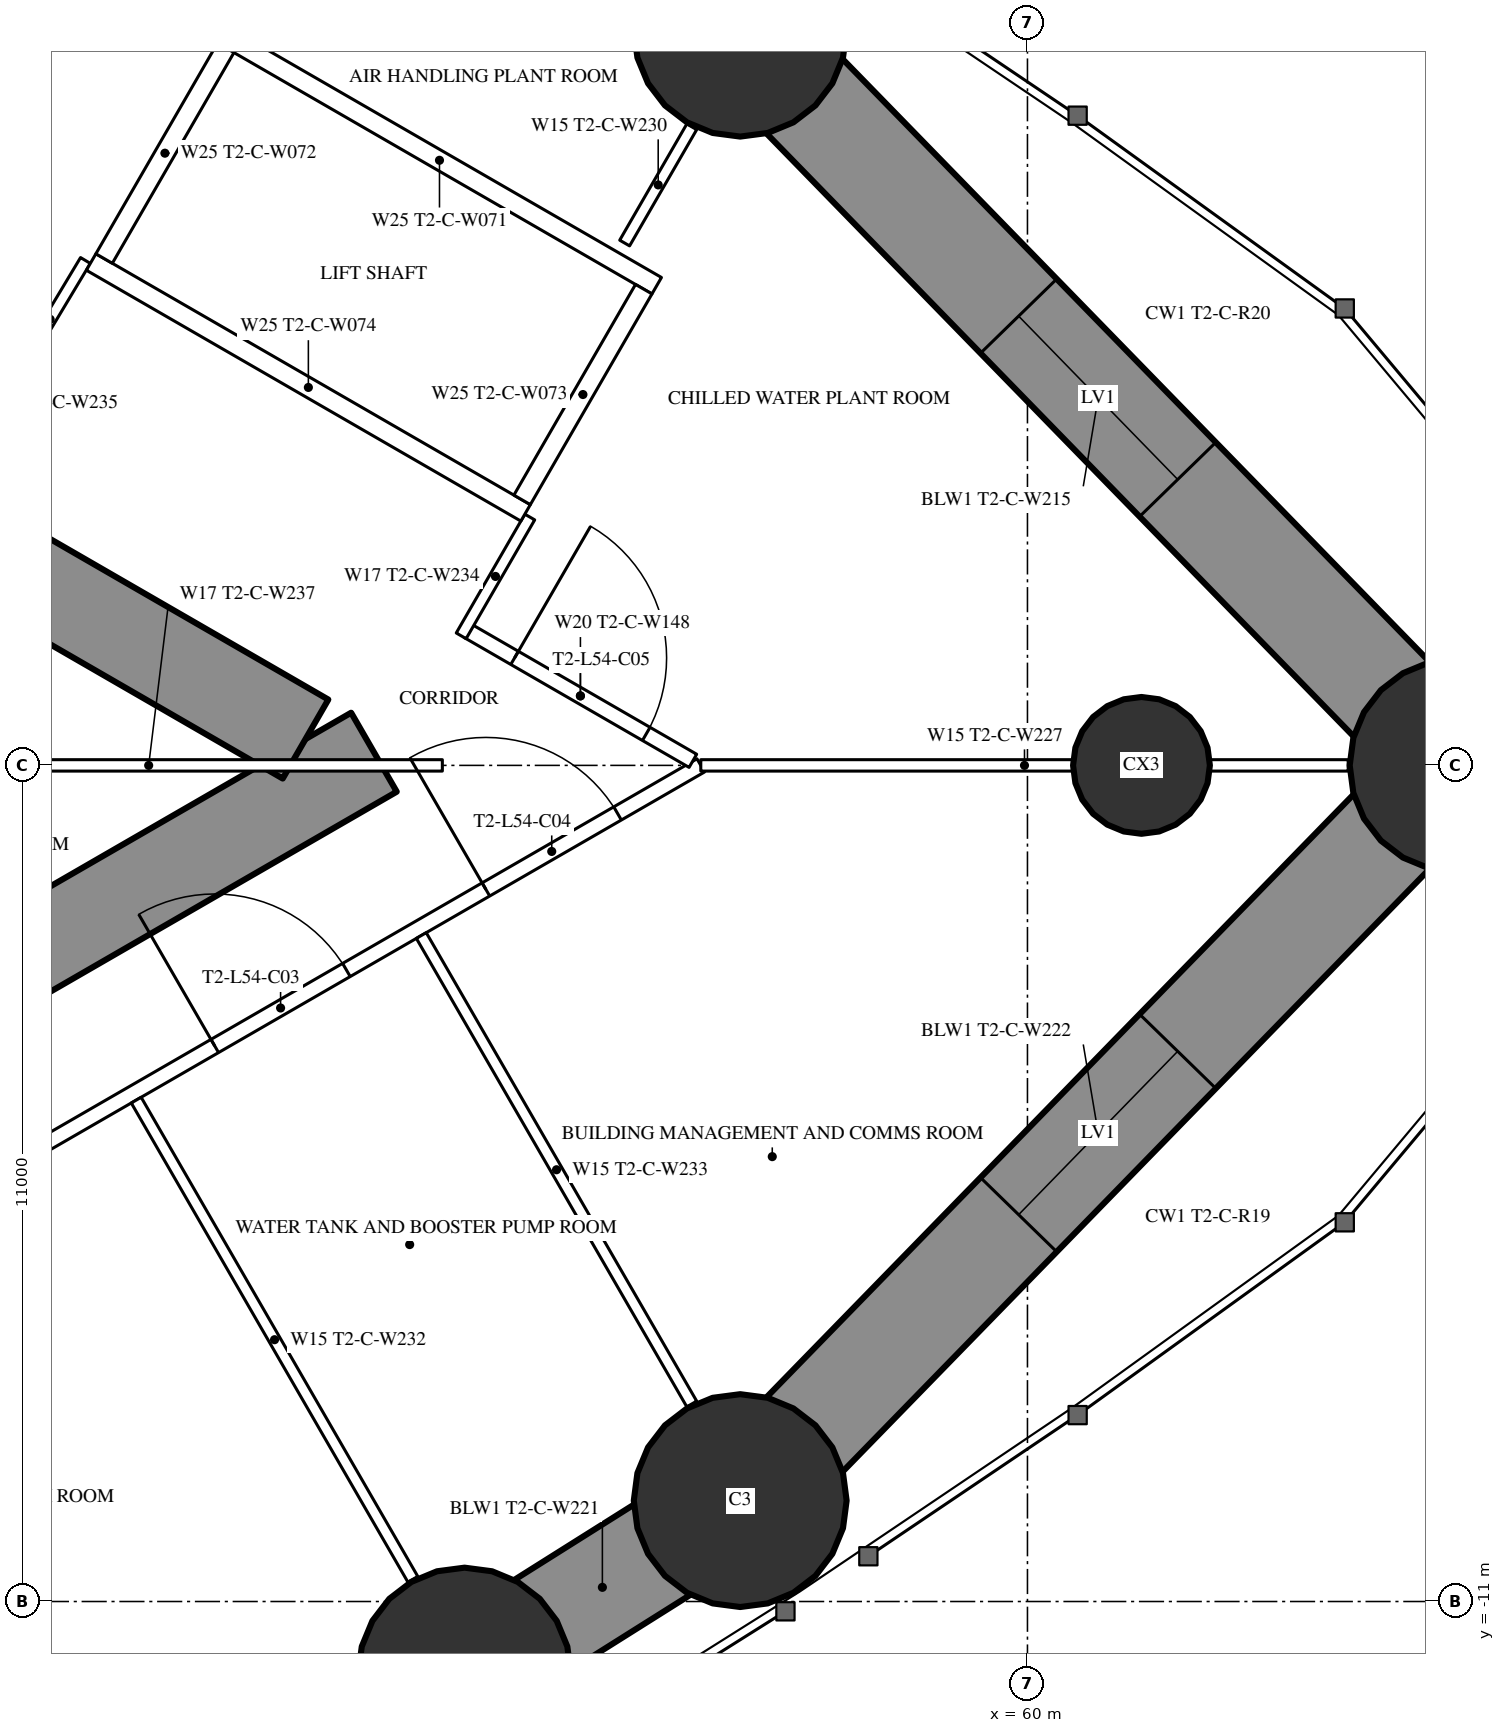
"""IFC4 building model, lengths in metres.
Left out: names, types, materials, properties, quantities, classifications, styles, units other than length and angle.
Written with IfcOpenShell. Run it as: python <this file> out.ifc"""

import sys

from ifc_helpers import new_model, si_unit, direction, frame, frame_2d, origin, origin_2d, place, context, subcontext, project, spatial, rectangle, circle, extrude, element, fill, save


model = new_model("IFC4")
c1 = context("Model", 3, precision=1e-05, world=origin(), true_north=direction((0.0, 1.0)))
c2 = subcontext(c1, "Body", "Model", "MODEL_VIEW")
j1 = project(units=[si_unit("LENGTHUNIT", "METRE"), si_unit("PLANEANGLEUNIT", "RADIAN")], contexts=[c1])
p1 = place(None, origin())
s1 = spatial("IfcSite", under=j1, at=p1, CompositionType="ELEMENT")
p2 = place(p1, origin())
s2 = spatial("IfcBuilding", under=s1, at=p2, CompositionType="ELEMENT")
p3 = place(p2, frame((0.0, 0.0, 201.8)))
s3 = spatial("IfcBuildingStorey", under=s2, at=p3, CompositionType="ELEMENT", Elevation=201.8)
for number, where, z_axis, x_axis in (
    (1, (65.64, 0.0, 0.0), (0.0, 0.0, 1.0), (1.0, 0.0, 0.0)),
    (2, (56.221, 9.672, 0.0), (0.0, 0.0, 1.0), (1.0, 0.0, 0.0)),
    (3, (52.594, -11.955, 0.0), (0.0, 0.0, 1.0), (1.0, 0.0, 0.0)),
    (4, (56.221, -9.672, 0.0), (0.0, 0.0, 1.0), (1.0, 0.0, 0.0)),
):
    element("IfcColumn", number, at=place(p3, frame(where, z_axis=z_axis, x_axis=x_axis)), inside=s3, PredefinedType="COLUMN", context=c2, shape_type="SweptSolid", body=[
        extrude(circle(Radius=1.4, at=origin_2d()), origin(), (0.0, 0.0, 1.0), 3.5),
    ])
p4 = place(p3, frame((61.5, 0.0, 0.0), z_axis=(0.0, 0.0, 1.0), x_axis=(1.0, 0.0, 0.0)))
e5 = element("IfcColumn", 5, at=p4, inside=s3, PredefinedType="COLUMN", context=c2, shape_type="SweptSolid", body=[
    extrude(circle(Radius=0.9, at=origin_2d()), origin(), (0.0, 0.0, 1.0), 3.5),
])
p5 = place(p3, frame((27.2, -13.8, 0.0), z_axis=(0.0, 0.0, 1.0), x_axis=(0.866027159892, 0.499996958321, 0.0)))
e6 = element("IfcWall", 6, at=p5, inside=s3, PredefinedType="SHEAR", context=c2, shape_type="SweptSolid", body=[
    extrude(rectangle(XDim=27.947, YDim=1.2, at=frame_2d((13.973, 0.0))), origin(), (0.0, 0.0, 1.0), 3.5),
])
p6 = place(p5, frame((6.5, 0.0, 0.0)))
e7 = element("IfcOpeningElement", 7, at=p6, cuts=e6, PredefinedType="OPENING", context=c2, shape_type="SweptSolid", body=[
    extrude(rectangle(XDim=1.0, YDim=2.2, at=frame_2d((0.5, 1.1))), frame((0.0, 0.61, 0.0), z_axis=(0.0, -1.0, 0.0), x_axis=(1.0, 0.0, 0.0)), (0.0, 0.0, 1.0), 1.22),
])
p7 = place(p5, frame((14.045, 0.0, 0.0)))
e8 = element("IfcOpeningElement", 8, at=p7, cuts=e6, PredefinedType="OPENING", context=c2, shape_type="SweptSolid", body=[
    extrude(rectangle(XDim=1.8, YDim=2.2, at=frame_2d((0.9, 1.1))), frame((0.0, 0.61, 0.0), z_axis=(0.0, -1.0, 0.0), x_axis=(1.0, 0.0, 0.0)), (0.0, 0.0, 1.0), 1.22),
])
p8 = place(p3, frame((27.2, 13.8, 0.0), z_axis=(0.0, 0.0, 1.0), x_axis=(0.866024515034, -0.500001539357, 0.0)))
e9 = element("IfcWall", 9, at=p8, inside=s3, PredefinedType="SHEAR", context=c2, shape_type="SweptSolid", body=[
    extrude(rectangle(XDim=26.907, YDim=1.2, at=frame_2d((13.454, 0.0))), origin(), (0.0, 0.0, 1.0), 3.5),
])
p9 = place(p8, frame((6.5, 0.0, 0.0)))
e10 = element("IfcOpeningElement", 10, at=p9, cuts=e9, PredefinedType="OPENING", context=c2, shape_type="SweptSolid", body=[
    extrude(rectangle(XDim=1.0, YDim=2.2, at=frame_2d((0.5, 1.1))), frame((0.0, 0.61, 0.0), z_axis=(0.0, -1.0, 0.0), x_axis=(1.0, 0.0, 0.0)), (0.0, 0.0, 1.0), 1.22),
])
p10 = place(p8, frame((12.545, 0.0, 0.0)))
e11 = element("IfcOpeningElement", 11, at=p10, cuts=e9, PredefinedType="OPENING", context=c2, shape_type="SweptSolid", body=[
    extrude(rectangle(XDim=1.8, YDim=2.2, at=frame_2d((0.9, 1.1))), frame((0.0, 0.61, 0.0), z_axis=(0.0, -1.0, 0.0), x_axis=(1.0, 0.0, 0.0)), (0.0, 0.0, 1.0), 1.22),
])
p11 = place(p3, frame((45.134, -16.168, 0.0), z_axis=(0.0, 0.0, 1.0), x_axis=(0.870721990329, 0.491775574381, 0.0)))
e12 = element("IfcWall", 12, at=p11, inside=s3, PredefinedType="SHEAR", context=c2, shape_type="SweptSolid", body=[
    extrude(rectangle(XDim=8.569, YDim=1.4, at=frame_2d((4.284, 0.0))), origin(), (0.0, 0.0, 1.0), 3.5),
])
p12 = place(p11, frame((2.784, 0.0, 0.6)))
e13 = element("IfcOpeningElement", 13, at=p12, cuts=e12, PredefinedType="OPENING", context=c2, shape_type="SweptSolid", body=[
    extrude(rectangle(XDim=3.0, YDim=1.2, at=frame_2d((1.5, 0.6))), frame((0.0, 0.71, 0.0), z_axis=(0.0, -1.0, 0.0), x_axis=(1.0, 0.0, 0.0)), (0.0, 0.0, 1.0), 1.42),
])
p13 = place(p3, frame((52.594, -11.955, 0.0), z_axis=(0.0, 0.0, 1.0), x_axis=(0.846348902569, 0.532628890617, 0.0)))
e14 = element("IfcWall", 14, at=p13, inside=s3, PredefinedType="SHEAR", context=c2, shape_type="SweptSolid", body=[
    extrude(rectangle(XDim=4.285, YDim=1.4, at=frame_2d((2.143, 0.0))), origin(), (0.0, 0.0, 1.0), 3.5),
])
p14 = place(p3, frame((56.221, -9.672, 0.0), z_axis=(0.0, 0.0, 1.0), x_axis=(0.697649905443, 0.716438838587, 0.0)))
e15 = element("IfcWall", 15, at=p14, inside=s3, PredefinedType="SHEAR", context=c2, shape_type="SweptSolid", body=[
    extrude(rectangle(XDim=13.501, YDim=1.4, at=frame_2d((6.75, 0.0))), origin(), (0.0, 0.0, 1.0), 3.5),
])
p15 = place(p14, frame((5.25, 0.0, 0.6)))
e16 = element("IfcOpeningElement", 16, at=p15, cuts=e15, PredefinedType="OPENING", context=c2, shape_type="SweptSolid", body=[
    extrude(rectangle(XDim=3.0, YDim=1.2, at=frame_2d((1.5, 0.6))), frame((0.0, 0.71, 0.0), z_axis=(0.0, -1.0, 0.0), x_axis=(1.0, 0.0, 0.0)), (0.0, 0.0, 1.0), 1.42),
])
p16 = place(p3, frame((65.64, 0.0, 0.0), z_axis=(0.0, 0.0, 1.0), x_axis=(-0.697649905443, 0.716438838587, 0.0)))
e17 = element("IfcWall", 17, at=p16, inside=s3, PredefinedType="SHEAR", context=c2, shape_type="SweptSolid", body=[
    extrude(rectangle(XDim=13.501, YDim=1.4, at=frame_2d((6.75, 0.0))), origin(), (0.0, 0.0, 1.0), 3.5),
])
p17 = place(p16, frame((5.25, 0.0, 0.6)))
e18 = element("IfcOpeningElement", 18, at=p17, cuts=e17, PredefinedType="OPENING", context=c2, shape_type="SweptSolid", body=[
    extrude(rectangle(XDim=3.0, YDim=1.2, at=frame_2d((1.5, 0.6))), frame((0.0, 0.71, 0.0), z_axis=(0.0, -1.0, 0.0), x_axis=(1.0, 0.0, 0.0)), (0.0, 0.0, 1.0), 1.42),
])
p18 = place(p3, frame((56.221, 9.672, 0.0), z_axis=(0.0, 0.0, 1.0), x_axis=(-0.854692251129, 0.519135007353, 0.0)))
e19 = element("IfcWall", 19, at=p18, inside=s3, PredefinedType="SHEAR", context=c2, shape_type="SweptSolid", body=[
    extrude(rectangle(XDim=8.569, YDim=1.4, at=frame_2d((4.284, 0.0))), origin(), (0.0, 0.0, 1.0), 3.5),
])
p19 = place(p18, frame((2.784, 0.0, 0.6)))
e20 = element("IfcOpeningElement", 20, at=p19, cuts=e19, PredefinedType="OPENING", context=c2, shape_type="SweptSolid", body=[
    extrude(rectangle(XDim=3.0, YDim=1.2, at=frame_2d((1.5, 0.6))), frame((0.0, 0.71, 0.0), z_axis=(0.0, -1.0, 0.0), x_axis=(1.0, 0.0, 0.0)), (0.0, 0.0, 1.0), 1.42),
])
p20 = place(p3, frame((27.903, -16.05, 0.0), z_axis=(0.0, 0.0, 1.0), x_axis=(0.866022581743, 0.500004887887, 0.0)))
e21 = element("IfcWall", 21, at=p20, inside=s3, PredefinedType="PARTITIONING", context=c2, shape_type="SweptSolid", body=[
    extrude(rectangle(XDim=32.1, YDim=0.2, at=frame_2d((16.05, 0.0))), origin(), (0.0, 0.0, 1.0), 3.25),
])
p21 = place(p20, frame((5.212, 0.0, 0.0)))
e22 = element("IfcOpeningElement", 22, at=p21, cuts=e21, PredefinedType="OPENING", context=c2, shape_type="SweptSolid", body=[
    extrude(rectangle(XDim=2.0, YDim=2.4, at=frame_2d((1.0, 1.2))), frame((0.0, 0.11, 0.0), z_axis=(0.0, -1.0, 0.0), x_axis=(1.0, 0.0, 0.0)), (0.0, 0.0, 1.0), 0.22),
])
p22 = place(p20, frame((18.133, 0.0, 0.0)))
e23 = element("IfcOpeningElement", 23, at=p22, cuts=e21, PredefinedType="OPENING", context=c2, shape_type="SweptSolid", body=[
    extrude(rectangle(XDim=2.0, YDim=2.4, at=frame_2d((1.0, 1.2))), frame((0.0, 0.11, 0.0), z_axis=(0.0, -1.0, 0.0), x_axis=(1.0, 0.0, 0.0)), (0.0, 0.0, 1.0), 0.22),
])
p23 = place(p20, frame((24.717, 0.0, 0.0)))
e24 = element("IfcOpeningElement", 24, at=p23, cuts=e21, PredefinedType="OPENING", context=c2, shape_type="SweptSolid", body=[
    extrude(rectangle(XDim=2.0, YDim=2.4, at=frame_2d((1.0, 1.2))), frame((0.0, 0.11, 0.0), z_axis=(0.0, -1.0, 0.0), x_axis=(1.0, 0.0, 0.0)), (0.0, 0.0, 1.0), 0.22),
])
p24 = place(p20, frame((28.836, 0.0, 0.0)))
e25 = element("IfcOpeningElement", 25, at=p24, cuts=e21, PredefinedType="OPENING", context=c2, shape_type="SweptSolid", body=[
    extrude(rectangle(XDim=2.0, YDim=2.4, at=frame_2d((1.0, 1.2))), frame((0.0, 0.11, 0.0), z_axis=(0.0, -1.0, 0.0), x_axis=(1.0, 0.0, 0.0)), (0.0, 0.0, 1.0), 0.22),
])
p25 = place(p3, frame((48.275, -4.404, 0.0), z_axis=(0.0, 0.0, 1.0), x_axis=(0.500006004368, -0.866021937133, 0.0)))
e26 = element("IfcWall", 26, at=p25, inside=s3, PredefinedType="PARTITIONING", context=c2, shape_type="SweptSolid", body=[
    extrude(rectangle(XDim=7.279, YDim=0.15, at=frame_2d((3.64, 0.0))), origin(), (0.0, 0.0, 1.0), 2.05),
])
p26 = place(p3, frame((52.025, -2.238, 0.0), z_axis=(0.0, 0.0, 1.0), x_axis=(0.499983785035, -0.866034765296, 0.0)))
e27 = element("IfcWall", 27, at=p26, inside=s3, PredefinedType="PARTITIONING", context=c2, shape_type="SweptSolid", body=[
    extrude(rectangle(XDim=7.116, YDim=0.15, at=frame_2d((3.558, 0.0))), origin(), (0.0, 0.0, 1.0), 2.05),
])
p27 = place(p3, frame((44.521, 6.571, 0.0), z_axis=(0.0, 0.0, 1.0), x_axis=(0.500020376429, 0.866013639128, 0.0)))
e28 = element("IfcWall", 28, at=p27, inside=s3, PredefinedType="PARTITIONING", context=c2, shape_type="SweptSolid", body=[
    extrude(rectangle(XDim=7.306, YDim=0.15, at=frame_2d((3.653, 0.0))), origin(), (0.0, 0.0, 1.0), 2.05),
])
p28 = place(p3, frame((55.702, 0.0, 0.0), z_axis=(0.0, 0.0, 1.0), x_axis=(1.0, 0.0, 0.0)))
e29 = element("IfcWall", 29, at=p28, inside=s3, PredefinedType="PARTITIONING", context=c2, shape_type="SweptSolid", body=[
    extrude(rectangle(XDim=8.518, YDim=0.15, at=frame_2d((4.259, 0.0))), origin(), (0.0, 0.0, 1.0), 2.05),
])
p29 = place(p3, frame((54.7, 6.872, 0.0), z_axis=(0.0, 0.0, 1.0), x_axis=(0.499989690894, 0.866031355668, 0.0)))
e30 = element("IfcWall", 30, at=p29, inside=s3, PredefinedType="PARTITIONING", context=c2, shape_type="SweptSolid", body=[
    extrude(rectangle(XDim=1.766, YDim=0.15, at=frame_2d((0.883, 0.0))), origin(), (0.0, 0.0, 1.0), 3.25),
])
p30 = place(p3, frame((52.639, 1.769, 0.0), z_axis=(0.0, 0.0, 1.0), x_axis=(0.866027340901, -0.4999966448, 0.0)))
e31 = element("IfcWall", 31, at=p30, inside=s3, PredefinedType="PARTITIONING", context=c2, shape_type="SweptSolid", body=[
    extrude(rectangle(XDim=3.417, YDim=0.2, at=frame_2d((1.708, 0.0))), origin(), (0.0, 0.0, 1.0), 3.25),
])
p31 = place(p30, frame((0.708, 0.0, 0.0)))
e32 = element("IfcOpeningElement", 32, at=p31, cuts=e31, PredefinedType="OPENING", context=c2, shape_type="SweptSolid", body=[
    extrude(rectangle(XDim=2.0, YDim=2.03, at=frame_2d((1.0, 1.015))), frame((0.0, 0.11, 0.0), z_axis=(0.0, -1.0, 0.0), x_axis=(1.0, 0.0, 0.0)), (0.0, 0.0, 1.0), 0.22),
])
p32 = place(p3, frame((52.55, 1.704, 0.0), z_axis=(0.0, 0.0, 1.0), x_axis=(0.499980071345, 0.866036909293, 0.0)))
e33 = element("IfcWall", 33, at=p32, inside=s3, PredefinedType="PARTITIONING", context=c2, shape_type="SweptSolid", body=[
    extrude(rectangle(XDim=1.805, YDim=0.15, at=frame_2d((0.902, 0.0))), origin(), (0.0, 0.0, 1.0), 3.25),
])
p33 = place(p3, frame((47.606, 6.642, 0.0), z_axis=(0.0, 0.0, 1.0), x_axis=(-0.514296815006, -0.857612258585, 0.0)))
e34 = element("IfcWall", 34, at=p33, inside=s3, PredefinedType="PARTITIONING", context=c2, shape_type="SweptSolid", body=[
    extrude(rectangle(XDim=1.805, YDim=0.15, at=frame_2d((0.902, 0.0))), origin(), (0.0, 0.0, 1.0), 3.25),
])
p34 = place(p3, frame((44.575, 0.0, 0.0), z_axis=(0.0, 0.0, 1.0), x_axis=(1.0, 0.0, 0.0)))
e35 = element("IfcWall", 35, at=p34, inside=s3, PredefinedType="PARTITIONING", context=c2, shape_type="SweptSolid", body=[
    extrude(rectangle(XDim=7.727, YDim=0.15, at=frame_2d((3.864, 0.0))), origin(), (0.0, 0.0, 1.0), 2.05),
])
for number, where, z_axis, x_axis in (
    (36, (47.681, 6.622, 0.0), (0.0, 0.0, 1.0), (0.866, -0.5, 0.0)),
    (37, (49.406, 9.611, 0.0), (0.0, 0.0, 1.0), (0.866, -0.5, 0.0)),
):
    element("IfcWall", number, at=place(p3, frame(where, z_axis=z_axis, x_axis=x_axis)), inside=s3, PredefinedType="PARTITIONING", context=c2, shape_type="SweptSolid", body=[
        extrude(rectangle(XDim=6.6, YDim=0.25, at=frame_2d((3.3, 0.0))), origin(), (0.0, 0.0, 1.0), 3.25),
    ])
p35 = place(p3, frame((47.852, 6.668, 0.0), z_axis=(0.0, 0.0, 1.0), x_axis=(0.499929347863, 0.866066190972, 0.0)))
e38 = element("IfcWall", 38, at=p35, inside=s3, PredefinedType="PARTITIONING", context=c2, shape_type="SweptSolid", body=[
    extrude(rectangle(XDim=3.201, YDim=0.25, at=frame_2d((1.6, 0.0))), origin(), (0.0, 0.0, 1.0), 3.25),
])
p36 = place(p3, frame((53.352, 3.493, 0.0), z_axis=(0.0, 0.0, 1.0), x_axis=(0.499872130319, 0.866099216793, 0.0)))
e39 = element("IfcWall", 39, at=p36, inside=s3, PredefinedType="PARTITIONING", context=c2, shape_type="SweptSolid", body=[
    extrude(rectangle(XDim=3.2, YDim=0.25, at=frame_2d((1.6, 0.0))), origin(), (0.0, 0.0, 1.0), 3.25),
])
p37 = place(p15, origin())
e40 = element("IfcWindow", 40, at=p37, inside=s3, PartitioningType="SINGLE_PANEL", PredefinedType="WINDOW", context=c2, shape_type="SweptSolid", body=[
    extrude(rectangle(XDim=3.0, YDim=1.2, at=frame_2d((1.5, 0.6))), frame((0.0, 0.03, 0.0), z_axis=(0.0, -1.0, 0.0), x_axis=(1.0, 0.0, 0.0)), (0.0, 0.0, 1.0), 0.06),
])
fill(e16, e40)
p38 = place(p17, origin())
e41 = element("IfcWindow", 41, at=p38, inside=s3, PartitioningType="SINGLE_PANEL", PredefinedType="WINDOW", context=c2, shape_type="SweptSolid", body=[
    extrude(rectangle(XDim=3.0, YDim=1.2, at=frame_2d((1.5, 0.6))), frame((0.0, 0.03, 0.0), z_axis=(0.0, -1.0, 0.0), x_axis=(1.0, 0.0, 0.0)), (0.0, 0.0, 1.0), 0.06),
])
fill(e18, e41)
p39 = place(p23, origin())
e42 = element("IfcDoor", 42, at=p39, inside=s3, OperationType="DOUBLE_DOOR_SINGLE_SWING", PredefinedType="DOOR", context=c2, shape_type="SweptSolid", body=[
    extrude(rectangle(XDim=2.0, YDim=2.4, at=frame_2d((1.0, 1.2))), frame((0.0, 0.025, 0.0), z_axis=(0.0, -1.0, 0.0), x_axis=(1.0, 0.0, 0.0)), (0.0, 0.0, 1.0), 0.05),
])
fill(e24, e42)
p40 = place(p24, origin())
e43 = element("IfcDoor", 43, at=p40, inside=s3, OperationType="DOUBLE_DOOR_SINGLE_SWING", PredefinedType="DOOR", context=c2, shape_type="SweptSolid", body=[
    extrude(rectangle(XDim=2.0, YDim=2.4, at=frame_2d((1.0, 1.2))), frame((0.0, 0.025, 0.0), z_axis=(0.0, -1.0, 0.0), x_axis=(1.0, 0.0, 0.0)), (0.0, 0.0, 1.0), 0.05),
])
fill(e25, e43)
p41 = place(p31, origin())
e44 = element("IfcDoor", 44, at=p41, inside=s3, OperationType="DOUBLE_DOOR_SINGLE_SWING", PredefinedType="DOOR", context=c2, shape_type="SweptSolid", body=[
    extrude(rectangle(XDim=2.0, YDim=2.03, at=frame_2d((1.0, 1.015))), frame((0.0, 0.025, 0.0), z_axis=(0.0, -1.0, 0.0), x_axis=(1.0, 0.0, 0.0)), (0.0, 0.0, 1.0), 0.05),
])
fill(e32, e44)
save(model, sys.argv[1])
